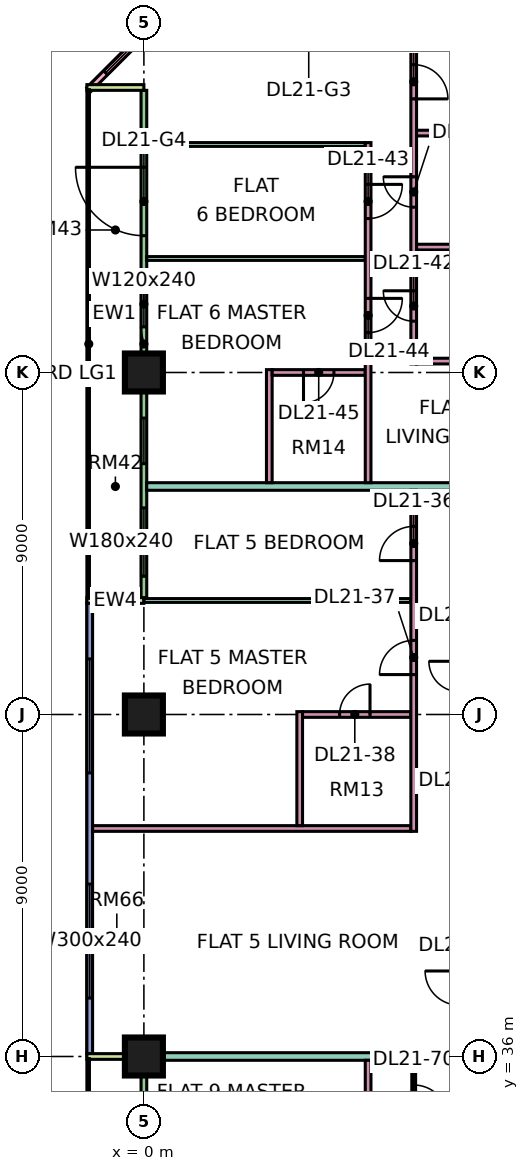
"""IFC4 building model, lengths in metres.
Left out: names, types, materials, properties, quantities, classifications, styles, units other than length and angle.
Written with IfcOpenShell. Run it as: python <this file> out.ifc"""

import sys

from ifc_helpers import new_model, si_unit, direction, frame, frame_2d, origin, origin_2d, place, context, subcontext, project, spatial, rectangle, extrude, element, fill, save


model = new_model("IFC4")
c1 = context("Model", 3, precision=1e-05, world=origin(), true_north=direction((0.0, 1.0)))
c2 = subcontext(c1, "Body", "Model", "MODEL_VIEW")
j1 = project(units=[si_unit("LENGTHUNIT", "METRE"), si_unit("PLANEANGLEUNIT", "RADIAN")], contexts=[c1])
p1 = place(None, origin())
s1 = spatial("IfcSite", under=j1, at=p1, CompositionType="ELEMENT")
p2 = place(p1, origin())
s2 = spatial("IfcBuilding", under=s1, at=p2, CompositionType="ELEMENT")
p3 = place(p2, frame((0.0, 0.0, 95.65)))
s3 = spatial("IfcBuildingStorey", under=s2, at=p3, CompositionType="ELEMENT", Elevation=95.65)
p4 = place(p3, frame((0.0, 36.0, 0.0), z_axis=(0.0, 0.0, 1.0), x_axis=(1.0, 0.0, 0.0)))
e1 = element("IfcColumn", 1, at=p4, inside=s3, PredefinedType="COLUMN", context=c2, shape_type="SweptSolid", body=[
    extrude(rectangle(XDim=1.0, YDim=1.0, at=origin_2d()), origin(), (0.0, 0.0, 1.0), 3.75),
])
for number, where, z_axis, x_axis in (
    (2, (0.0, 45.0, 0.0), (0.0, 0.0, 1.0), (1.0, 0.0, 0.0)),
    (3, (0.0, 54.0, 0.0), (0.0, 0.0, 1.0), (1.0, 0.0, 0.0)),
):
    element("IfcColumn", number, at=place(p3, frame(where, z_axis=z_axis, x_axis=x_axis)), inside=s3, PredefinedType="COLUMN", context=c2, shape_type="SweptSolid", body=[
        extrude(rectangle(XDim=1.0, YDim=1.0, at=origin_2d()), origin(), (0.0, 0.0, 1.0), 3.75),
    ])
p5 = place(p3, frame((1.553, 64.447, 0.0), z_axis=(0.0, 0.0, 1.0), x_axis=(-0.707106781187, -0.707106781187, 0.0)))
e4 = element("IfcWall", 4, at=p5, inside=s3, PredefinedType="SOLIDWALL", context=c2, shape_type="SweptSolid", body=[
    extrude(rectangle(XDim=4.243, YDim=0.15, at=frame_2d((2.121, 0.0))), origin(), (0.0, 0.0, 1.0), 3.35),
])
p6 = place(p5, frame((0.621, 0.0, 0.45)))
e5 = element("IfcOpeningElement", 5, at=p6, cuts=e4, PredefinedType="OPENING", context=c2, shape_type="SweptSolid", body=[
    extrude(rectangle(XDim=3.0, YDim=2.4, at=frame_2d((1.5, 1.2))), frame((0.0, 0.085, 0.0), z_axis=(0.0, -1.0, 0.0), x_axis=(1.0, 0.0, 0.0)), (0.0, 0.0, 1.0), 0.17),
])
p7 = place(p3, frame((0.0, 61.425, 0.0), z_axis=(0.0, 0.0, 1.0), x_axis=(0.0, -1.0, 0.0)))
e6 = element("IfcWall", 6, at=p7, inside=s3, PredefinedType="SOLIDWALL", context=c2, shape_type="SweptSolid", body=[
    extrude(rectangle(XDim=13.35, YDim=0.15, at=frame_2d((6.675, 0.0))), origin(), (0.0, 0.0, 1.0), 3.35),
])
p8 = place(p7, frame((2.025, 0.0, 0.0)))
e7 = element("IfcOpeningElement", 7, at=p8, cuts=e6, PredefinedType="OPENING", context=c2, shape_type="SweptSolid", body=[
    extrude(rectangle(XDim=1.8, YDim=2.4, at=frame_2d((0.9, 1.2))), frame((0.0, 0.085, 0.0), z_axis=(0.0, -1.0, 0.0), x_axis=(1.0, 0.0, 0.0)), (0.0, 0.0, 1.0), 0.17),
])
p9 = place(p7, frame((5.025, 0.0, 0.45)))
e8 = element("IfcOpeningElement", 8, at=p9, cuts=e6, PredefinedType="OPENING", context=c2, shape_type="SweptSolid", body=[
    extrude(rectangle(XDim=1.2, YDim=2.4, at=frame_2d((0.6, 1.2))), frame((0.0, 0.085, 0.0), z_axis=(0.0, -1.0, 0.0), x_axis=(1.0, 0.0, 0.0)), (0.0, 0.0, 1.0), 0.17),
])
p10 = place(p7, frame((8.625, 0.0, 0.45)))
e9 = element("IfcOpeningElement", 9, at=p10, cuts=e6, PredefinedType="OPENING", context=c2, shape_type="SweptSolid", body=[
    extrude(rectangle(XDim=1.2, YDim=2.4, at=frame_2d((0.6, 1.2))), frame((0.0, 0.085, 0.0), z_axis=(0.0, -1.0, 0.0), x_axis=(1.0, 0.0, 0.0)), (0.0, 0.0, 1.0), 0.17),
])
p11 = place(p7, frame((10.988, 0.0, 0.45)))
e10 = element("IfcOpeningElement", 10, at=p11, cuts=e6, PredefinedType="OPENING", context=c2, shape_type="SweptSolid", body=[
    extrude(rectangle(XDim=1.8, YDim=2.4, at=frame_2d((0.9, 1.2))), frame((0.0, 0.085, 0.0), z_axis=(0.0, -1.0, 0.0), x_axis=(1.0, 0.0, 0.0)), (0.0, 0.0, 1.0), 0.17),
])
for number, where, z_axis, x_axis in (
    (11, (-1.5, 61.5, 0.0), (0.0, 0.0, 1.0), (1.0, 0.0, 0.0)),
    (12, (-1.5, 48.0, 0.0), (0.0, 0.0, 1.0), (1.0, 0.0, 0.0)),
):
    element("IfcWall", number, at=place(p3, frame(where, z_axis=z_axis, x_axis=x_axis)), inside=s3, PredefinedType="SOLIDWALL", context=c2, shape_type="SweptSolid", body=[
        extrude(rectangle(XDim=1.5, YDim=0.15, at=frame_2d((0.75, 0.0))), origin(), (0.0, 0.0, 1.0), 3.35),
    ])
p12 = place(p3, frame((-1.425, 47.925, 0.0), z_axis=(0.0, 0.0, 1.0), x_axis=(0.0, -1.0, 0.0)))
e13 = element("IfcWall", 13, at=p12, inside=s3, PredefinedType="SOLIDWALL", context=c2, shape_type="SweptSolid", body=[
    extrude(rectangle(XDim=11.85, YDim=0.15, at=frame_2d((5.925, 0.0))), origin(), (0.0, 0.0, 1.0), 3.35),
])
p13 = place(p12, frame((1.462, 0.0, 0.45)))
e14 = element("IfcOpeningElement", 14, at=p13, cuts=e13, PredefinedType="OPENING", context=c2, shape_type="SweptSolid", body=[
    extrude(rectangle(XDim=3.0, YDim=2.4, at=frame_2d((1.5, 1.2))), frame((0.0, 0.085, 0.0), z_axis=(0.0, -1.0, 0.0), x_axis=(1.0, 0.0, 0.0)), (0.0, 0.0, 1.0), 0.17),
])
p14 = place(p12, frame((7.387, 0.0, 0.45)))
e15 = element("IfcOpeningElement", 15, at=p14, cuts=e13, PredefinedType="OPENING", context=c2, shape_type="SweptSolid", body=[
    extrude(rectangle(XDim=3.0, YDim=2.4, at=frame_2d((1.5, 1.2))), frame((0.0, 0.085, 0.0), z_axis=(0.0, -1.0, 0.0), x_axis=(1.0, 0.0, 0.0)), (0.0, 0.0, 1.0), 0.17),
])
p15 = place(p3, frame((0.0, 35.925, 0.0), z_axis=(0.0, 0.0, 1.0), x_axis=(0.0, -1.0, 0.0)))
e16 = element("IfcWall", 16, at=p15, inside=s3, PredefinedType="SOLIDWALL", context=c2, shape_type="SweptSolid", body=[
    extrude(rectangle(XDim=11.85, YDim=0.15, at=frame_2d((5.925, 0.0))), origin(), (0.0, 0.0, 1.0), 3.35),
])
p16 = place(p15, frame((2.325, 0.0, 0.0)))
e17 = element("IfcOpeningElement", 17, at=p16, cuts=e16, PredefinedType="OPENING", context=c2, shape_type="SweptSolid", body=[
    extrude(rectangle(XDim=1.8, YDim=2.4, at=frame_2d((0.9, 1.2))), frame((0.0, 0.085, 0.0), z_axis=(0.0, -1.0, 0.0), x_axis=(1.0, 0.0, 0.0)), (0.0, 0.0, 1.0), 0.17),
])
p17 = place(p15, frame((7.125, 0.0, 0.45)))
e18 = element("IfcOpeningElement", 18, at=p17, cuts=e16, PredefinedType="OPENING", context=c2, shape_type="SweptSolid", body=[
    extrude(rectangle(XDim=3.0, YDim=2.4, at=frame_2d((1.5, 1.2))), frame((0.0, 0.085, 0.0), z_axis=(0.0, -1.0, 0.0), x_axis=(1.0, 0.0, 0.0)), (0.0, 0.0, 1.0), 0.17),
])
p18 = place(p3, frame((-1.5, 36.0, 0.0), z_axis=(0.0, 0.0, 1.0), x_axis=(1.0, 0.0, 0.0)))
e19 = element("IfcWall", 19, at=p18, inside=s3, PredefinedType="SOLIDWALL", context=c2, shape_type="SweptSolid", body=[
    extrude(rectangle(XDim=1.5, YDim=0.15, at=frame_2d((0.75, 0.0))), origin(), (0.0, 0.0, 1.0), 3.35),
])
e20 = element("IfcWall", 20, at=p4, inside=s3, PredefinedType="PARTITIONING", context=c2, shape_type="SweptSolid", body=[
    extrude(rectangle(XDim=12.4, YDim=0.2, at=frame_2d((6.2, 0.0))), origin(), (0.0, 0.0, 1.0), 3.35),
])
p19 = place(p3, frame((-1.35, 42.0, 0.0), z_axis=(0.0, 0.0, 1.0), x_axis=(1.0, 0.0, 0.0)))
e21 = element("IfcWall", 21, at=p19, inside=s3, PredefinedType="PARTITIONING", context=c2, shape_type="SweptSolid", body=[
    extrude(rectangle(XDim=8.375, YDim=0.15, at=frame_2d((4.188, 0.0))), origin(), (0.0, 0.0, 1.0), 3.35),
])
p20 = place(p3, frame((0.0, 48.0, 0.0), z_axis=(0.0, 0.0, 1.0), x_axis=(1.0, 0.0, 0.0)))
e22 = element("IfcWall", 22, at=p20, inside=s3, PredefinedType="PARTITIONING", context=c2, shape_type="SweptSolid", body=[
    extrude(rectangle(XDim=7.025, YDim=0.1, at=frame_2d((3.512, 0.0))), origin(), (0.0, 0.0, 1.0), 3.35),
])
p21 = place(p3, frame((0.074, 51.0, 0.0), z_axis=(0.0, 0.0, 1.0), x_axis=(1.0, 0.0, 0.0)))
e23 = element("IfcWall", 23, at=p21, inside=s3, PredefinedType="PARTITIONING", context=c2, shape_type="SweptSolid", body=[
    extrude(rectangle(XDim=12.326, YDim=0.2, at=frame_2d((6.163, 0.0))), origin(), (0.0, 0.0, 1.0), 3.35),
])
for number, where, z_axis, x_axis in (
    (24, (0.074, 57.0, 0.0), (0.0, 0.0, 1.0), (1.0, 0.0, 0.0)),
    (25, (0.074, 60.0, 0.0), (0.0, 0.0, 1.0), (1.0, 0.0, 0.0)),
):
    element("IfcWall", number, at=place(p3, frame(where, z_axis=z_axis, x_axis=x_axis)), inside=s3, PredefinedType="PARTITIONING", context=c2, shape_type="SweptSolid", body=[
        extrude(rectangle(XDim=5.751, YDim=0.1, at=frame_2d((2.875, 0.0))), origin(), (0.0, 0.0, 1.0), 3.35),
    ])
p22 = place(p3, frame((3.3, 51.1, 0.0), z_axis=(0.0, 0.0, 1.0), x_axis=(0.0, 1.0, 0.0)))
e26 = element("IfcWall", 26, at=p22, inside=s3, PredefinedType="PARTITIONING", context=c2, shape_type="SweptSolid", body=[
    extrude(rectangle(XDim=2.975, YDim=0.15, at=frame_2d((1.487, 0.0))), origin(), (0.0, 0.0, 1.0), 3.35),
])
p23 = place(p3, frame((3.375, 54.0, 0.0), z_axis=(0.0, 0.0, 1.0), x_axis=(1.0, 0.0, 0.0)))
e27 = element("IfcWall", 27, at=p23, inside=s3, PredefinedType="PARTITIONING", context=c2, shape_type="SweptSolid", body=[
    extrude(rectangle(XDim=2.45, YDim=0.15, at=frame_2d((1.225, 0.0))), origin(), (0.0, 0.0, 1.0), 3.35),
])
p24 = place(p23, frame((0.825, 0.0, 0.0)))
e28 = element("IfcOpeningElement", 28, at=p24, cuts=e27, PredefinedType="OPENING", context=c2, shape_type="SweptSolid", body=[
    extrude(rectangle(XDim=0.8, YDim=2.1, at=frame_2d((0.4, 1.05))), frame((0.0, 0.085, 0.0), z_axis=(0.0, -1.0, 0.0), x_axis=(1.0, 0.0, 0.0)), (0.0, 0.0, 1.0), 0.17),
])
p25 = place(p3, frame((4.1, 42.075, 0.0), z_axis=(0.0, 0.0, 1.0), x_axis=(0.0, 1.0, 0.0)))
e29 = element("IfcWall", 29, at=p25, inside=s3, PredefinedType="PARTITIONING", context=c2, shape_type="SweptSolid", body=[
    extrude(rectangle(XDim=3.0, YDim=0.15, at=frame_2d((1.5, 0.0))), origin(), (0.0, 0.0, 1.0), 3.35),
])
p26 = place(p3, frame((4.175, 45.0, 0.0), z_axis=(0.0, 0.0, 1.0), x_axis=(1.0, 0.0, 0.0)))
e30 = element("IfcWall", 30, at=p26, inside=s3, PredefinedType="PARTITIONING", context=c2, shape_type="SweptSolid", body=[
    extrude(rectangle(XDim=2.85, YDim=0.15, at=frame_2d((1.425, 0.0))), origin(), (0.0, 0.0, 1.0), 3.35),
])
p27 = place(p26, frame((0.975, 0.0, 0.0)))
e31 = element("IfcOpeningElement", 31, at=p27, cuts=e30, PredefinedType="OPENING", context=c2, shape_type="SweptSolid", body=[
    extrude(rectangle(XDim=0.8, YDim=2.1, at=frame_2d((0.4, 1.05))), frame((0.0, 0.085, 0.0), z_axis=(0.0, -1.0, 0.0), x_axis=(1.0, 0.0, 0.0)), (0.0, 0.0, 1.0), 0.17),
])
p28 = place(p3, frame((5.9, 29.925, 0.0), z_axis=(0.0, 0.0, 1.0), x_axis=(0.0, 1.0, 0.0)))
e32 = element("IfcWall", 32, at=p28, inside=s3, PredefinedType="PARTITIONING", context=c2, shape_type="SweptSolid", body=[
    extrude(rectangle(XDim=5.975, YDim=0.15, at=frame_2d((2.987, 0.0))), origin(), (0.0, 0.0, 1.0), 3.35),
])
p29 = place(p28, frame((4.125, 0.0, 0.0)))
e33 = element("IfcOpeningElement", 33, at=p29, cuts=e32, PredefinedType="OPENING", context=c2, shape_type="SweptSolid", body=[
    extrude(rectangle(XDim=0.9, YDim=2.1, at=frame_2d((0.45, 1.05))), frame((0.0, 0.085, 0.0), z_axis=(0.0, -1.0, 0.0), x_axis=(1.0, 0.0, 0.0)), (0.0, 0.0, 1.0), 0.17),
])
p30 = place(p3, frame((5.9, 51.1, 0.0), z_axis=(0.0, 0.0, 1.0), x_axis=(0.0, 1.0, 0.0)))
e34 = element("IfcWall", 34, at=p30, inside=s3, PredefinedType="PARTITIONING", context=c2, shape_type="SweptSolid", body=[
    extrude(rectangle(XDim=8.95, YDim=0.15, at=frame_2d((4.475, 0.0))), origin(), (0.0, 0.0, 1.0), 3.35),
])
p31 = place(p30, frame((6.95, 0.0, 0.0)))
e35 = element("IfcOpeningElement", 35, at=p31, cuts=e34, PredefinedType="OPENING", context=c2, shape_type="SweptSolid", body=[
    extrude(rectangle(XDim=0.9, YDim=2.1, at=frame_2d((0.45, 1.05))), frame((0.0, 0.085, 0.0), z_axis=(0.0, -1.0, 0.0), x_axis=(1.0, 0.0, 0.0)), (0.0, 0.0, 1.0), 0.17),
])
p32 = place(p30, frame((3.95, 0.0, 0.0)))
e36 = element("IfcOpeningElement", 36, at=p32, cuts=e34, PredefinedType="OPENING", context=c2, shape_type="SweptSolid", body=[
    extrude(rectangle(XDim=0.9, YDim=2.1, at=frame_2d((0.45, 1.05))), frame((0.0, 0.085, 0.0), z_axis=(0.0, -1.0, 0.0), x_axis=(1.0, 0.0, 0.0)), (0.0, 0.0, 1.0), 0.17),
])
p33 = place(p3, frame((7.1, 33.65, 0.0), z_axis=(0.0, 0.0, 1.0), x_axis=(0.0, 1.0, 0.0)))
e37 = element("IfcWall", 37, at=p33, inside=s3, PredefinedType="PARTITIONING", context=c2, shape_type="SweptSolid", body=[
    extrude(rectangle(XDim=2.25, YDim=0.1, at=frame_2d((1.125, 0.0))), origin(), (0.0, 0.0, 1.0), 3.35),
])
p34 = place(p33, frame((0.7, 0.0, 0.0)))
e38 = element("IfcOpeningElement", 38, at=p34, cuts=e37, PredefinedType="OPENING", context=c2, shape_type="SweptSolid", body=[
    extrude(rectangle(XDim=0.9, YDim=2.1, at=frame_2d((0.45, 1.05))), frame((0.0, 0.06, 0.0), z_axis=(0.0, -1.0, 0.0), x_axis=(1.0, 0.0, 0.0)), (0.0, 0.0, 1.0), 0.12),
])
p35 = place(p3, frame((7.1, 41.925, 0.0), z_axis=(0.0, 0.0, 1.0), x_axis=(0.0, 1.0, 0.0)))
e39 = element("IfcWall", 39, at=p35, inside=s3, PredefinedType="PARTITIONING", context=c2, shape_type="SweptSolid", body=[
    extrude(rectangle(XDim=8.975, YDim=0.15, at=frame_2d((4.487, 0.0))), origin(), (0.0, 0.0, 1.0), 3.35),
])
p36 = place(p35, frame((7.125, 0.0, 0.0)))
e40 = element("IfcOpeningElement", 40, at=p36, cuts=e39, PredefinedType="OPENING", context=c2, shape_type="SweptSolid", body=[
    extrude(rectangle(XDim=0.9, YDim=2.1, at=frame_2d((0.45, 1.05))), frame((0.0, 0.085, 0.0), z_axis=(0.0, -1.0, 0.0), x_axis=(1.0, 0.0, 0.0)), (0.0, 0.0, 1.0), 0.17),
])
p37 = place(p35, frame((4.125, 0.0, 0.0)))
e41 = element("IfcOpeningElement", 41, at=p37, cuts=e39, PredefinedType="OPENING", context=c2, shape_type="SweptSolid", body=[
    extrude(rectangle(XDim=0.9, YDim=2.1, at=frame_2d((0.45, 1.05))), frame((0.0, 0.085, 0.0), z_axis=(0.0, -1.0, 0.0), x_axis=(1.0, 0.0, 0.0)), (0.0, 0.0, 1.0), 0.17),
])
p38 = place(p3, frame((7.1, 54.225, 0.0), z_axis=(0.0, 0.0, 1.0), x_axis=(0.0, 1.0, 0.0)))
e42 = element("IfcWall", 42, at=p38, inside=s3, PredefinedType="PARTITIONING", context=c2, shape_type="SweptSolid", body=[
    extrude(rectangle(XDim=8.701, YDim=0.15, at=frame_2d((4.351, 0.0))), origin(), (0.0, 0.0, 1.0), 3.35),
])
p39 = place(p38, frame((1.125, 0.0, 0.0)))
e43 = element("IfcOpeningElement", 43, at=p39, cuts=e42, PredefinedType="OPENING", context=c2, shape_type="SweptSolid", body=[
    extrude(rectangle(XDim=0.8, YDim=2.1, at=frame_2d((0.4, 1.05))), frame((0.0, 0.085, 0.0), z_axis=(0.0, -1.0, 0.0), x_axis=(1.0, 0.0, 0.0)), (0.0, 0.0, 1.0), 0.17),
])
p40 = place(p38, frame((6.975, 0.0, 0.0)))
e44 = element("IfcOpeningElement", 44, at=p40, cuts=e42, PredefinedType="OPENING", context=c2, shape_type="SweptSolid", body=[
    extrude(rectangle(XDim=0.9, YDim=2.1, at=frame_2d((0.45, 1.05))), frame((0.0, 0.085, 0.0), z_axis=(0.0, -1.0, 0.0), x_axis=(1.0, 0.0, 0.0)), (0.0, 0.0, 1.0), 0.17),
])
p41 = place(p38, frame((4.125, 0.0, 0.0)))
e45 = element("IfcOpeningElement", 45, at=p41, cuts=e42, PredefinedType="OPENING", context=c2, shape_type="SweptSolid", body=[
    extrude(rectangle(XDim=0.8, YDim=2.1, at=frame_2d((0.4, 1.05))), frame((0.0, 0.085, 0.0), z_axis=(0.0, -1.0, 0.0), x_axis=(1.0, 0.0, 0.0)), (0.0, 0.0, 1.0), 0.17),
])
for number, where, z_axis, x_axis in (
    (46, (7.175, 54.3, 0.0), (0.0, 0.0, 1.0), (1.0, 0.0, 0.0)),
    (47, (7.175, 57.3, 0.0), (0.0, 0.0, 1.0), (1.0, 0.0, 0.0)),
    (48, (7.175, 60.3, 0.0), (0.0, 0.0, 1.0), (1.0, 0.0, 0.0)),
):
    element("IfcWall", number, at=place(p3, frame(where, z_axis=z_axis, x_axis=x_axis)), inside=s3, PredefinedType="PARTITIONING", context=c2, shape_type="SweptSolid", body=[
        extrude(rectangle(XDim=5.225, YDim=0.15, at=frame_2d((2.612, 0.0))), origin(), (0.0, 0.0, 1.0), 3.35),
    ])
p42 = place(p6, origin())
e49 = element("IfcWindow", 49, at=p42, inside=s3, PartitioningType="SINGLE_PANEL", PredefinedType="WINDOW", context=c2, shape_type="SweptSolid", body=[
    extrude(rectangle(XDim=3.0, YDim=2.4, at=frame_2d((1.5, 1.2))), frame((0.0, 0.03, 0.0), z_axis=(0.0, -1.0, 0.0), x_axis=(1.0, 0.0, 0.0)), (0.0, 0.0, 1.0), 0.06),
])
fill(e5, e49)
p43 = place(p8, frame((1.8, 0.0, 0.0), z_axis=(0.0, 0.0, 1.0), x_axis=(-1.0, 0.0, 0.0)))
e50 = element("IfcDoor", 50, at=p43, inside=s3, OperationType="DOUBLE_DOOR_SINGLE_SWING", PredefinedType="DOOR", context=c2, shape_type="SweptSolid", body=[
    extrude(rectangle(XDim=1.8, YDim=2.4, at=frame_2d((0.9, 1.2))), frame((0.0, 0.025, 0.0), z_axis=(0.0, -1.0, 0.0), x_axis=(1.0, 0.0, 0.0)), (0.0, 0.0, 1.0), 0.05),
])
fill(e7, e50)
p44 = place(p9, origin())
e51 = element("IfcWindow", 51, at=p44, inside=s3, PartitioningType="SINGLE_PANEL", PredefinedType="WINDOW", context=c2, shape_type="SweptSolid", body=[
    extrude(rectangle(XDim=1.2, YDim=2.4, at=frame_2d((0.6, 1.2))), frame((0.0, 0.03, 0.0), z_axis=(0.0, -1.0, 0.0), x_axis=(1.0, 0.0, 0.0)), (0.0, 0.0, 1.0), 0.06),
])
fill(e8, e51)
p45 = place(p10, origin())
e52 = element("IfcWindow", 52, at=p45, inside=s3, PartitioningType="SINGLE_PANEL", PredefinedType="WINDOW", context=c2, shape_type="SweptSolid", body=[
    extrude(rectangle(XDim=1.2, YDim=2.4, at=frame_2d((0.6, 1.2))), frame((0.0, 0.03, 0.0), z_axis=(0.0, -1.0, 0.0), x_axis=(1.0, 0.0, 0.0)), (0.0, 0.0, 1.0), 0.06),
])
fill(e9, e52)
p46 = place(p11, origin())
e53 = element("IfcWindow", 53, at=p46, inside=s3, PartitioningType="SINGLE_PANEL", PredefinedType="WINDOW", context=c2, shape_type="SweptSolid", body=[
    extrude(rectangle(XDim=1.8, YDim=2.4, at=frame_2d((0.9, 1.2))), frame((0.0, 0.03, 0.0), z_axis=(0.0, -1.0, 0.0), x_axis=(1.0, 0.0, 0.0)), (0.0, 0.0, 1.0), 0.06),
])
fill(e10, e53)
p47 = place(p13, origin())
e54 = element("IfcWindow", 54, at=p47, inside=s3, PartitioningType="SINGLE_PANEL", PredefinedType="WINDOW", context=c2, shape_type="SweptSolid", body=[
    extrude(rectangle(XDim=3.0, YDim=2.4, at=frame_2d((1.5, 1.2))), frame((0.0, 0.03, 0.0), z_axis=(0.0, -1.0, 0.0), x_axis=(1.0, 0.0, 0.0)), (0.0, 0.0, 1.0), 0.06),
])
fill(e14, e54)
p48 = place(p14, origin())
e55 = element("IfcWindow", 55, at=p48, inside=s3, PartitioningType="SINGLE_PANEL", PredefinedType="WINDOW", context=c2, shape_type="SweptSolid", body=[
    extrude(rectangle(XDim=3.0, YDim=2.4, at=frame_2d((1.5, 1.2))), frame((0.0, 0.03, 0.0), z_axis=(0.0, -1.0, 0.0), x_axis=(1.0, 0.0, 0.0)), (0.0, 0.0, 1.0), 0.06),
])
fill(e15, e55)
p49 = place(p36, origin())
e56 = element("IfcDoor", 56, at=p49, inside=s3, OperationType="SINGLE_SWING_LEFT", PredefinedType="DOOR", context=c2, shape_type="SweptSolid", body=[
    extrude(rectangle(XDim=0.9, YDim=2.1, at=frame_2d((0.45, 1.05))), frame((0.0, 0.025, 0.0), z_axis=(0.0, -1.0, 0.0), x_axis=(1.0, 0.0, 0.0)), (0.0, 0.0, 1.0), 0.05),
])
fill(e40, e56)
p50 = place(p37, origin())
e57 = element("IfcDoor", 57, at=p50, inside=s3, OperationType="SINGLE_SWING_LEFT", PredefinedType="DOOR", context=c2, shape_type="SweptSolid", body=[
    extrude(rectangle(XDim=0.9, YDim=2.1, at=frame_2d((0.45, 1.05))), frame((0.0, 0.025, 0.0), z_axis=(0.0, -1.0, 0.0), x_axis=(1.0, 0.0, 0.0)), (0.0, 0.0, 1.0), 0.05),
])
fill(e41, e57)
p51 = place(p27, frame((0.8, 0.0, 0.0), z_axis=(0.0, 0.0, 1.0), x_axis=(-1.0, 0.0, 0.0)))
e58 = element("IfcDoor", 58, at=p51, inside=s3, OperationType="SINGLE_SWING_RIGHT", PredefinedType="DOOR", context=c2, shape_type="SweptSolid", body=[
    extrude(rectangle(XDim=0.8, YDim=2.1, at=frame_2d((0.4, 1.05))), frame((0.0, 0.025, 0.0), z_axis=(0.0, -1.0, 0.0), x_axis=(1.0, 0.0, 0.0)), (0.0, 0.0, 1.0), 0.05),
])
fill(e31, e58)
p52 = place(p39, frame((0.8, 0.0, 0.0), z_axis=(0.0, 0.0, 1.0), x_axis=(-1.0, 0.0, 0.0)))
e59 = element("IfcDoor", 59, at=p52, inside=s3, OperationType="SINGLE_SWING_RIGHT", PredefinedType="DOOR", context=c2, shape_type="SweptSolid", body=[
    extrude(rectangle(XDim=0.8, YDim=2.1, at=frame_2d((0.4, 1.05))), frame((0.0, 0.025, 0.0), z_axis=(0.0, -1.0, 0.0), x_axis=(1.0, 0.0, 0.0)), (0.0, 0.0, 1.0), 0.05),
])
fill(e43, e59)
p53 = place(p31, origin())
e60 = element("IfcDoor", 60, at=p53, inside=s3, OperationType="SINGLE_SWING_RIGHT", PredefinedType="DOOR", context=c2, shape_type="SweptSolid", body=[
    extrude(rectangle(XDim=0.9, YDim=2.1, at=frame_2d((0.45, 1.05))), frame((0.0, 0.025, 0.0), z_axis=(0.0, -1.0, 0.0), x_axis=(1.0, 0.0, 0.0)), (0.0, 0.0, 1.0), 0.05),
])
fill(e35, e60)
p54 = place(p32, origin())
e61 = element("IfcDoor", 61, at=p54, inside=s3, OperationType="SINGLE_SWING_RIGHT", PredefinedType="DOOR", context=c2, shape_type="SweptSolid", body=[
    extrude(rectangle(XDim=0.9, YDim=2.1, at=frame_2d((0.45, 1.05))), frame((0.0, 0.025, 0.0), z_axis=(0.0, -1.0, 0.0), x_axis=(1.0, 0.0, 0.0)), (0.0, 0.0, 1.0), 0.05),
])
fill(e36, e61)
p55 = place(p24, frame((0.8, 0.0, 0.0), z_axis=(0.0, 0.0, 1.0), x_axis=(-1.0, 0.0, 0.0)))
e62 = element("IfcDoor", 62, at=p55, inside=s3, OperationType="SINGLE_SWING_LEFT", PredefinedType="DOOR", context=c2, shape_type="SweptSolid", body=[
    extrude(rectangle(XDim=0.8, YDim=2.1, at=frame_2d((0.4, 1.05))), frame((0.0, 0.025, 0.0), z_axis=(0.0, -1.0, 0.0), x_axis=(1.0, 0.0, 0.0)), (0.0, 0.0, 1.0), 0.05),
])
fill(e28, e62)
p56 = place(p40, frame((0.9, 0.0, 0.0), z_axis=(0.0, 0.0, 1.0), x_axis=(-1.0, 0.0, 0.0)))
e63 = element("IfcDoor", 63, at=p56, inside=s3, OperationType="SINGLE_SWING_LEFT", PredefinedType="DOOR", context=c2, shape_type="SweptSolid", body=[
    extrude(rectangle(XDim=0.9, YDim=2.1, at=frame_2d((0.45, 1.05))), frame((0.0, 0.025, 0.0), z_axis=(0.0, -1.0, 0.0), x_axis=(1.0, 0.0, 0.0)), (0.0, 0.0, 1.0), 0.05),
])
fill(e44, e63)
p57 = place(p41, frame((0.8, 0.0, 0.0), z_axis=(0.0, 0.0, 1.0), x_axis=(-1.0, 0.0, 0.0)))
e64 = element("IfcDoor", 64, at=p57, inside=s3, OperationType="SINGLE_SWING_RIGHT", PredefinedType="DOOR", context=c2, shape_type="SweptSolid", body=[
    extrude(rectangle(XDim=0.8, YDim=2.1, at=frame_2d((0.4, 1.05))), frame((0.0, 0.025, 0.0), z_axis=(0.0, -1.0, 0.0), x_axis=(1.0, 0.0, 0.0)), (0.0, 0.0, 1.0), 0.05),
])
fill(e45, e64)
p58 = place(p34, frame((0.9, 0.0, 0.0), z_axis=(0.0, 0.0, 1.0), x_axis=(-1.0, 0.0, 0.0)))
e65 = element("IfcDoor", 65, at=p58, inside=s3, OperationType="SINGLE_SWING_LEFT", PredefinedType="DOOR", context=c2, shape_type="SweptSolid", body=[
    extrude(rectangle(XDim=0.9, YDim=2.1, at=frame_2d((0.45, 1.05))), frame((0.0, 0.025, 0.0), z_axis=(0.0, -1.0, 0.0), x_axis=(1.0, 0.0, 0.0)), (0.0, 0.0, 1.0), 0.05),
])
fill(e38, e65)
save(model, sys.argv[1])
